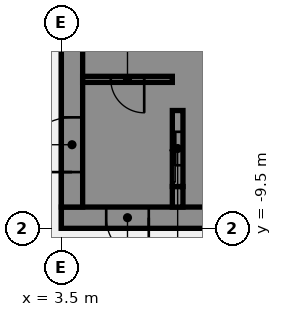
"""IFC4 building model, lengths in metres.
Left out: names, types, materials, properties, quantities, classifications, styles, units other than length and angle.
Written with IfcOpenShell. Run it as: python <this file> out.ifc"""

import sys

from ifc_helpers import new_model, si_unit, direction, frame, frame_2d, origin, place, context, subcontext, project, spatial, polyline, rectangle, outline, extrude, element, fill, save


model = new_model("IFC4")
c1 = context("Model", 3, precision=1e-05, world=origin(), true_north=direction((0.0, 1.0)))
c2 = subcontext(c1, "Body", "Model", "MODEL_VIEW")
j1 = project(units=[si_unit("LENGTHUNIT", "METRE"), si_unit("PLANEANGLEUNIT", "RADIAN")], contexts=[c1])
p1 = place(None, origin())
s1 = spatial("IfcSite", under=j1, at=p1, CompositionType="ELEMENT")
p2 = place(p1, origin())
s2 = spatial("IfcBuilding", under=s1, at=p2, CompositionType="ELEMENT")
p3 = place(p2, frame((0.0, 0.0, 75.25)))
s3 = spatial("IfcBuildingStorey", under=s2, at=p3, CompositionType="ELEMENT", Elevation=75.25)
p4 = place(p3, frame((16.5, -9.15, 0.0), z_axis=(0.0, 0.0, 1.0), x_axis=(-1.0, 0.0, 0.0)))
e1 = element("IfcWall", 1, at=p4, inside=s3, PredefinedType="SHEAR", context=c2, shape_type="SweptSolid", body=[
    extrude(rectangle(XDim=13.0, YDim=0.7, at=frame_2d((6.5, 0.0))), origin(), (0.0, 0.0, 1.0), 3.57),
])
p5 = place(p4, frame((4.15, 0.0, 0.0)))
e2 = element("IfcOpeningElement", 2, at=p5, cuts=e1, PredefinedType="OPENING", context=c2, shape_type="SweptSolid", body=[
    extrude(rectangle(XDim=1.4, YDim=2.1, at=frame_2d((0.7, 1.05))), frame((0.0, 0.36, 0.0), z_axis=(0.0, -1.0, 0.0), x_axis=(1.0, 0.0, 0.0)), (0.0, 0.0, 1.0), 0.72),
])
p6 = place(p4, frame((10.125, 0.0, 0.0)))
e3 = element("IfcOpeningElement", 3, at=p6, cuts=e1, PredefinedType="OPENING", context=c2, shape_type="SweptSolid", body=[
    extrude(rectangle(XDim=1.4, YDim=2.1, at=frame_2d((0.7, 1.05))), frame((0.0, 0.36, 0.0), z_axis=(0.0, -1.0, 0.0), x_axis=(1.0, 0.0, 0.0)), (0.0, 0.0, 1.0), 0.72),
])
p7 = place(p3, origin())
e4 = element("IfcWall", 4, at=p7, inside=s3, PredefinedType="SHEAR", context=c2, shape_type="SweptSolid", body=[
    extrude(outline(polyline([(9.8, -5.375), (7.5, -5.375), (7.5, -2.875), (9.8, -2.875), (9.8, -2.625), (7.5, -2.625), (7.5, -0.125), (9.8, -0.125), (9.8, 0.125), (7.5, 0.125), (7.5, 2.625), (9.8, 2.625), (9.8, 2.875), (7.5, 2.875), (7.5, 5.375), (9.8, 5.375), (9.8, 5.625), (7.5, 5.625), (7.5, 8.125), (9.8, 8.125), (9.8, 8.8), (7.5, 8.8), (7.15, 8.8), (7.15, -5.625), (7.5, -5.625), (9.8, -5.625), (9.8, -5.375)])), origin(), (0.0, 0.0, 1.0), 3.57),
])
p8 = place(p3, origin())
e5 = element("IfcWall", 5, at=p8, inside=s3, PredefinedType="SHEAR", context=c2, shape_type="SweptSolid", body=[
    extrude(outline(polyline([(7.5, -8.125), (7.5, -8.8), (9.8, -8.8), (9.8, -8.125), (9.8, -5.625), (9.55, -5.625), (9.55, -8.125), (7.5, -8.125)])), origin(), (0.0, 0.0, 1.0), 3.57),
])
p9 = place(p3, frame((7.325, -8.8, 0.0), z_axis=(0.0, 0.0, 1.0), x_axis=(0.0, 1.0, 0.0)))
e6 = element("IfcWall", 6, at=p9, inside=s3, PredefinedType="SHEAR", context=c2, shape_type="SweptSolid", body=[
    extrude(rectangle(XDim=0.675, YDim=0.35, at=frame_2d((0.337, 0.0))), origin(), (0.0, 0.0, 1.0), 3.57),
])
p10 = place(p3, frame((7.325, -8.125, 0.0), z_axis=(0.0, 0.0, 1.0), x_axis=(0.0, 1.0, 0.0)))
e7 = element("IfcWall", 7, at=p10, inside=s3, PredefinedType="SHEAR", context=c2, shape_type="SweptSolid", body=[
    extrude(rectangle(XDim=2.5, YDim=0.35, at=frame_2d((1.25, 0.0))), origin(), (0.0, 0.0, 1.0), 3.57),
])
p11 = place(p10, frame((0.7, 0.0, 0.0)))
e8 = element("IfcOpeningElement", 8, at=p11, cuts=e7, PredefinedType="OPENING", context=c2, shape_type="SweptSolid", body=[
    extrude(rectangle(XDim=1.1, YDim=2.1, at=frame_2d((0.55, 1.05))), frame((0.0, 0.185, 0.0), z_axis=(0.0, -1.0, 0.0), x_axis=(1.0, 0.0, 0.0)), (0.0, 0.0, 1.0), 0.37),
])
p12 = place(p3, frame((3.85, -8.8, 0.0), z_axis=(0.0, 0.0, 1.0), x_axis=(0.0, 1.0, 0.0)))
e9 = element("IfcWall", 9, at=p12, inside=s3, PredefinedType="SHEAR", context=c2, shape_type="SweptSolid", body=[
    extrude(rectangle(XDim=17.6, YDim=0.7, at=frame_2d((8.8, 0.0))), origin(), (0.0, 0.0, 1.0), 3.57),
])
p13 = place(p12, frame((1.15, 0.0, 0.0)))
e10 = element("IfcOpeningElement", 10, at=p13, cuts=e9, PredefinedType="OPENING", context=c2, shape_type="SweptSolid", body=[
    extrude(rectangle(XDim=1.8, YDim=2.1, at=frame_2d((0.9, 1.05))), frame((0.0, 0.36, 0.0), z_axis=(0.0, -1.0, 0.0), x_axis=(1.0, 0.0, 0.0)), (0.0, 0.0, 1.0), 0.72),
])
p14 = place(p12, frame((11.597, 0.0, 0.0)))
e11 = element("IfcOpeningElement", 11, at=p14, cuts=e9, PredefinedType="OPENING", context=c2, shape_type="SweptSolid", body=[
    extrude(rectangle(XDim=1.0, YDim=2.1, at=frame_2d((0.5, 1.05))), frame((0.0, 0.36, 0.0), z_axis=(0.0, -1.0, 0.0), x_axis=(1.0, 0.0, 0.0)), (0.0, 0.0, 1.0), 0.72),
])
p15 = place(p12, frame((15.123, 0.0, 0.0)))
e12 = element("IfcOpeningElement", 12, at=p15, cuts=e9, PredefinedType="OPENING", context=c2, shape_type="SweptSolid", body=[
    extrude(rectangle(XDim=1.0, YDim=2.1, at=frame_2d((0.5, 1.05))), frame((0.0, 0.36, 0.0), z_axis=(0.0, -1.0, 0.0), x_axis=(1.0, 0.0, 0.0)), (0.0, 0.0, 1.0), 0.72),
])
p16 = place(p3, frame((7.15, -4.6, 0.0), z_axis=(0.0, 0.0, 1.0), x_axis=(-1.0, 0.0, 0.0)))
e13 = element("IfcWall", 13, at=p16, inside=s3, PredefinedType="SHEAR", context=c2, shape_type="SweptSolid", body=[
    extrude(rectangle(XDim=2.95, YDim=0.2, at=frame_2d((1.475, 0.0))), origin(), (0.0, 0.0, 1.0), 3.57),
])
p17 = place(p16, frame((0.925, 0.0, 0.0)))
e14 = element("IfcOpeningElement", 14, at=p17, cuts=e13, PredefinedType="OPENING", context=c2, shape_type="SweptSolid", body=[
    extrude(rectangle(XDim=1.1, YDim=2.1, at=frame_2d((0.55, 1.05))), frame((0.0, 0.11, 0.0), z_axis=(0.0, -1.0, 0.0), x_axis=(1.0, 0.0, 0.0)), (0.0, 0.0, 1.0), 0.22),
])
p18 = place(p6, origin())
e15 = element("IfcDoor", 15, at=p18, inside=s3, OperationType="SINGLE_SWING_LEFT", PredefinedType="DOOR", context=c2, shape_type="SweptSolid", body=[
    extrude(rectangle(XDim=1.4, YDim=2.1, at=frame_2d((0.7, 1.05))), frame((0.0, 0.025, 0.0), z_axis=(0.0, -1.0, 0.0), x_axis=(1.0, 0.0, 0.0)), (0.0, 0.0, 1.0), 0.05),
])
fill(e3, e15)
p19 = place(p13, origin())
e16 = element("IfcDoor", 16, at=p19, inside=s3, OperationType="SINGLE_SWING_LEFT", PredefinedType="DOOR", context=c2, shape_type="SweptSolid", body=[
    extrude(rectangle(XDim=1.8, YDim=2.1, at=frame_2d((0.9, 1.05))), frame((0.0, 0.025, 0.0), z_axis=(0.0, -1.0, 0.0), x_axis=(1.0, 0.0, 0.0)), (0.0, 0.0, 1.0), 0.05),
])
fill(e10, e16)
p20 = place(p17, origin())
e17 = element("IfcDoor", 17, at=p20, inside=s3, OperationType="SINGLE_SWING_LEFT", PredefinedType="DOOR", context=c2, shape_type="SweptSolid", body=[
    extrude(rectangle(XDim=1.1, YDim=2.1, at=frame_2d((0.55, 1.05))), frame((0.0, 0.025, 0.0), z_axis=(0.0, -1.0, 0.0), x_axis=(1.0, 0.0, 0.0)), (0.0, 0.0, 1.0), 0.05),
])
fill(e14, e17)
p21 = place(p11, origin())
e18 = element("IfcDoor", 18, at=p21, inside=s3, OperationType="SLIDING_TO_LEFT", PredefinedType="DOOR", context=c2, shape_type="SweptSolid", body=[
    extrude(rectangle(XDim=1.1, YDim=2.1, at=frame_2d((0.55, 1.05))), frame((0.0, 0.025, 0.0), z_axis=(0.0, -1.0, 0.0), x_axis=(1.0, 0.0, 0.0)), (0.0, 0.0, 1.0), 0.05),
])
fill(e8, e18)
save(model, sys.argv[1])
